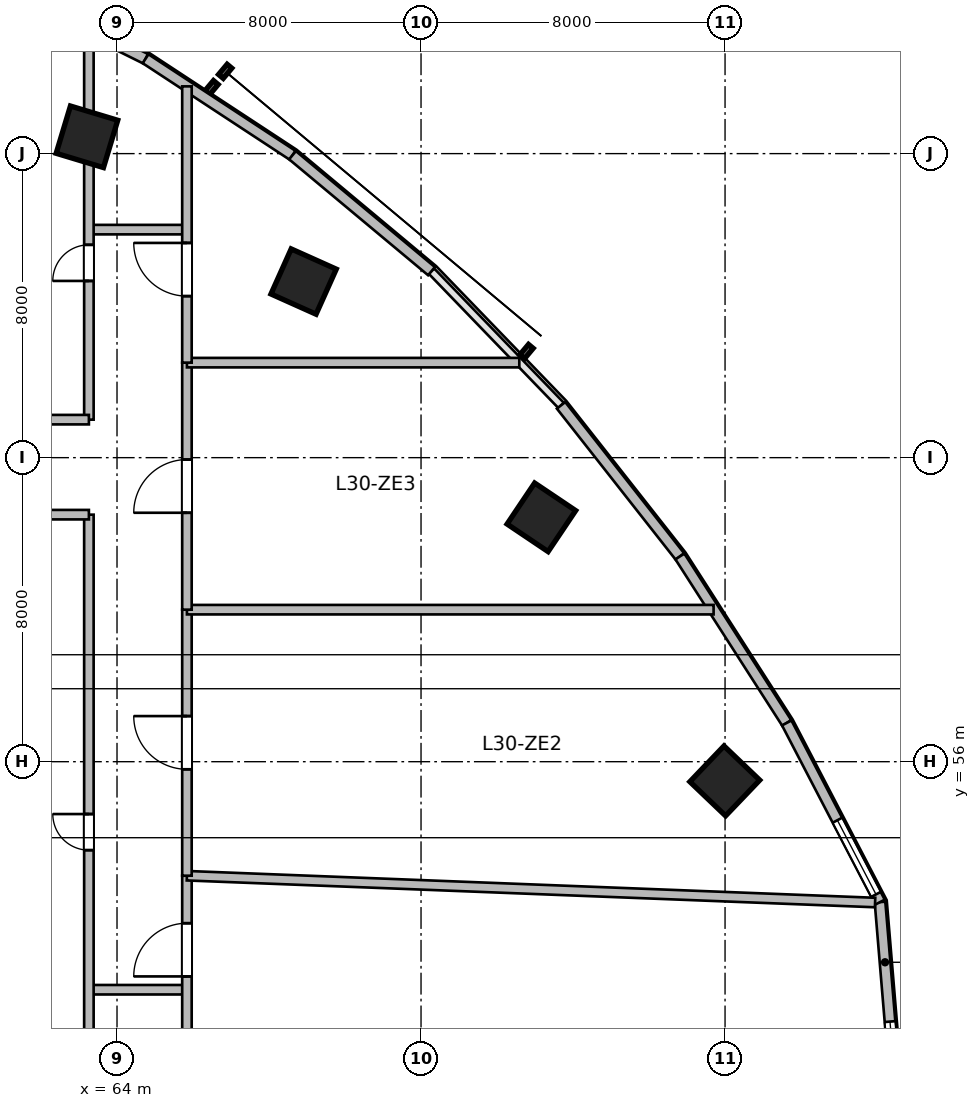
"""IFC4 building model, lengths in metres.
Left out: names, types, materials, properties, quantities, classifications, styles, units other than length and angle.
Written with IfcOpenShell. Run it as: python <this file> out.ifc"""

import sys

from ifc_helpers import new_model, si_unit, direction, frame, frame_2d, origin, origin_2d, place, context, subcontext, project, spatial, rectangle, extrude, source, transform, mapped, element, fill, save


model = new_model("IFC4")
c1 = context("Model", 3, precision=1e-05, world=origin(), true_north=direction((0.0, 1.0)))
c2 = subcontext(c1, "Body", "Model", "MODEL_VIEW")
j1 = project(units=[si_unit("LENGTHUNIT", "METRE"), si_unit("PLANEANGLEUNIT", "RADIAN")], contexts=[c1])
p1 = place(None, origin())
s1 = spatial("IfcSite", under=j1, at=p1, CompositionType="ELEMENT")
p2 = place(p1, origin())
s2 = spatial("IfcBuilding", under=s1, at=p2, CompositionType="ELEMENT")
p3 = place(p2, frame((0.0, 0.0, 127.2)))
s3 = spatial("IfcBuildingStorey", under=s2, at=p3, CompositionType="ELEMENT", Elevation=127.2)
m1 = source(origin(), c2, "Body", "SweptSolid", [
    extrude(rectangle(XDim=1.3, YDim=1.3, at=origin_2d()), origin(), (0.0, 0.0, 1.0), 3.9),
])
for number, where, z_axis, x_axis in (
    (1, (63.209, 72.442, 0.0), (0.0, 0.0, 1.0), (0.289, 0.957, 0.0)),
    (2, (68.91, 68.633, 0.0), (0.0, 0.0, 1.0), (0.409, 0.912, 0.0)),
    (3, (75.167, 62.43, 0.0), (0.0, 0.0, 1.0), (0.558, 0.83, 0.0)),
    (4, (79.993, 55.494, 0.0), (0.0, 0.0, 1.0), (0.691, 0.723, 0.0)),
):
    element("IfcColumn", number, at=place(p3, frame(where, z_axis=z_axis, x_axis=x_axis)), inside=s3, PredefinedType="COLUMN", context=c2, shape_type="MappedRepresentation", body=[
        mapped(m1, transform((0.0, 0.0, 0.0), scale=1.0)),
    ])
m2 = source(origin(), c2, "Body", "SweptSolid", [
    extrude(rectangle(XDim=5.674, YDim=0.28, at=frame_2d((2.837, 0.0))), origin(), (0.0, 0.0, 1.0), 3.65),
])
p4 = place(p3, frame((84.078, 52.305, 0.0), z_axis=(0.0, 0.0, 1.0), x_axis=(0.083309007867, -0.996523762491, 0.0)))
e5 = element("IfcWall", 5, at=p4, inside=s3, PredefinedType="SOLIDWALL", context=c2, shape_type="MappedRepresentation", body=[
    mapped(m2, transform((0.0, 0.0, 0.0), scale=1.0)),
])
p5 = place(p4, frame((3.155, 0.0, 0.95)))
e6 = element("IfcOpeningElement", 6, at=p5, cuts=e5, PredefinedType="OPENING", context=c2, shape_type="SweptSolid", body=[
    extrude(rectangle(XDim=2.2, YDim=2.1, at=frame_2d((1.1, 1.05))), frame((0.0, 0.15, 0.0), z_axis=(0.0, -1.0, 0.0), x_axis=(1.0, 0.0, 0.0)), (0.0, 0.0, 1.0), 0.3),
])
m3 = source(origin(), c2, "Body", "SweptSolid", [
    extrude(rectangle(XDim=4.506, YDim=0.28, at=frame_2d((2.253, 0.0))), origin(), (0.0, 0.0, 1.0), 3.65),
])
p6 = place(p3, frame((60.714, 76.497, 0.0), z_axis=(0.0, 0.0, 1.0), x_axis=(0.89597155075, -0.444111450254, 0.0)))
e7 = element("IfcWall", 7, at=p6, inside=s3, PredefinedType="SOLIDWALL", context=c2, shape_type="MappedRepresentation", body=[
    mapped(m3, transform((0.0, 0.0, 0.0), scale=1.0)),
])
m4 = source(origin(), c2, "Body", "SweptSolid", [
    extrude(rectangle(XDim=4.626, YDim=0.28, at=frame_2d((2.313, 0.0))), origin(), (0.0, 0.0, 1.0), 3.65),
])
p7 = place(p3, frame((64.751, 74.496, 0.0), z_axis=(0.0, 0.0, 1.0), x_axis=(0.83595938331, -0.548791316855, 0.0)))
e8 = element("IfcWall", 8, at=p7, inside=s3, PredefinedType="SOLIDWALL", context=c2, shape_type="MappedRepresentation", body=[
    mapped(m4, transform((0.0, 0.0, 0.0), scale=1.0)),
])
m5 = source(origin(), c2, "Body", "SweptSolid", [
    extrude(rectangle(XDim=4.762, YDim=0.28, at=frame_2d((2.381, 0.0))), origin(), (0.0, 0.0, 1.0), 3.65),
])
p8 = place(p3, frame((68.618, 71.958, 0.0), z_axis=(0.0, 0.0, 1.0), x_axis=(0.767952279762, -0.640507061638, 0.0)))
e9 = element("IfcWall", 9, at=p8, inside=s3, PredefinedType="SOLIDWALL", context=c2, shape_type="MappedRepresentation", body=[
    mapped(m5, transform((0.0, 0.0, 0.0), scale=1.0)),
])
m6 = source(origin(), c2, "Body", "SweptSolid", [
    extrude(rectangle(XDim=5.058, YDim=0.28, at=frame_2d((2.529, 0.0))), origin(), (0.0, 0.0, 1.0), 3.65),
])
p9 = place(p3, frame((75.685, 65.376, 0.0), z_axis=(0.0, 0.0, 1.0), x_axis=(0.618145507434, -0.786063694391, 0.0)))
e10 = element("IfcWall", 10, at=p9, inside=s3, PredefinedType="SOLIDWALL", context=c2, shape_type="MappedRepresentation", body=[
    mapped(m6, transform((0.0, 0.0, 0.0), scale=1.0)),
])
m7 = source(origin(), c2, "Body", "SweptSolid", [
    extrude(rectangle(XDim=5.205, YDim=0.28, at=frame_2d((2.603, 0.0))), origin(), (0.0, 0.0, 1.0), 3.65),
])
p10 = place(p3, frame((78.812, 61.4, 0.0), z_axis=(0.0, 0.0, 1.0), x_axis=(0.540188528895, -0.8415440293, 0.0)))
e11 = element("IfcWall", 11, at=p10, inside=s3, PredefinedType="SOLIDWALL", context=c2, shape_type="MappedRepresentation", body=[
    mapped(m7, transform((0.0, 0.0, 0.0), scale=1.0)),
])
m8 = source(origin(), c2, "Body", "SweptSolid", [
    extrude(rectangle(XDim=5.315, YDim=0.28, at=frame_2d((2.658, 0.0))), origin(), (0.0, 0.0, 1.0), 3.65),
])
p11 = place(p3, frame((81.623, 57.02, 0.0), z_axis=(0.0, 0.0, 1.0), x_axis=(0.461760527822, -0.887004630735, 0.0)))
e12 = element("IfcWall", 12, at=p11, inside=s3, PredefinedType="SOLIDWALL", context=c2, shape_type="MappedRepresentation", body=[
    mapped(m8, transform((0.0, 0.0, 0.0), scale=1.0)),
])
p12 = place(p11, frame((2.886, 0.0, 0.95)))
e13 = element("IfcOpeningElement", 13, at=p12, cuts=e12, PredefinedType="OPENING", context=c2, shape_type="SweptSolid", body=[
    extrude(rectangle(XDim=2.2, YDim=2.1, at=frame_2d((1.1, 1.05))), frame((0.0, 0.15, 0.0), z_axis=(0.0, -1.0, 0.0), x_axis=(1.0, 0.0, 0.0)), (0.0, 0.0, 1.0), 0.3),
])
m9 = source(origin(), c2, "Body", "SweptSolid", [
    extrude(rectangle(XDim=2.5, YDim=0.25, at=frame_2d((1.25, 0.0))), origin(), (0.0, 0.0, 1.0), 3.65),
])
for number, where, z_axis, x_axis in (
    (14, (63.3, 50.0, 0.0), (0.0, 0.0, 1.0), (1.0, 0.0, 0.0)),
    (15, (63.3, 70.0, 0.0), (0.0, 0.0, 1.0), (1.0, 0.0, 0.0)),
):
    element("IfcWall", number, at=place(p3, frame(where, z_axis=z_axis, x_axis=x_axis)), inside=s3, PredefinedType="PARTITIONING", context=c2, shape_type="MappedRepresentation", body=[
        mapped(m9, transform((0.0, 0.0, 0.0), scale=1.0)),
    ])
m10 = source(origin(), c2, "Body", "SweptSolid", [
    extrude(rectangle(XDim=10.726, YDim=0.25, at=frame_2d((5.363, 0.0))), origin(), (0.0, 0.0, 1.0), 2.942),
])
p13 = place(p3, frame((65.84, 42.274, 0.0), z_axis=(0.0, 0.0, 1.0), x_axis=(0.0, 1.0, 0.0)))
e16 = element("IfcWall", 16, at=p13, inside=s3, PredefinedType="PARTITIONING", context=c2, shape_type="MappedRepresentation", body=[
    mapped(m10, transform((0.0, 0.0, 0.0), scale=1.0)),
])
p14 = place(p13, frame((8.076, 0.0, 0.0)))
e17 = element("IfcOpeningElement", 17, at=p14, cuts=e16, PredefinedType="OPENING", context=c2, shape_type="SweptSolid", body=[
    extrude(rectangle(XDim=1.4, YDim=2.15, at=frame_2d((0.7, 1.075))), frame((0.0, 0.135, 0.0), z_axis=(0.0, -1.0, 0.0), x_axis=(1.0, 0.0, 0.0)), (0.0, 0.0, 1.0), 0.27),
])
m11 = source(origin(), c2, "Body", "SweptSolid", [
    extrude(rectangle(XDim=18.122, YDim=0.25, at=frame_2d((9.061, 0.0))), origin(), (0.0, 0.0, 1.0), 3.65),
])
p15 = place(p3, frame((65.84, 53.0, 0.0), z_axis=(0.0, 0.0, 1.0), x_axis=(0.999241241773, -0.038947923447, 0.0)))
e18 = element("IfcWall", 18, at=p15, inside=s3, PredefinedType="PARTITIONING", context=c2, shape_type="MappedRepresentation", body=[
    mapped(m11, transform((0.0, 0.0, 0.0), scale=1.0)),
])
m12 = source(origin(), c2, "Body", "SweptSolid", [
    extrude(rectangle(XDim=7.0, YDim=0.25, at=frame_2d((3.5, 0.0))), origin(), (0.0, 0.0, 1.0), 3.093),
])
p16 = place(p3, frame((65.84, 53.0, 0.0), z_axis=(0.0, 0.0, 1.0), x_axis=(0.0, 1.0, 0.0)))
e19 = element("IfcWall", 19, at=p16, inside=s3, PredefinedType="PARTITIONING", context=c2, shape_type="MappedRepresentation", body=[
    mapped(m12, transform((0.0, 0.0, 0.0), scale=1.0)),
])
p17 = place(p16, frame((2.8, 0.0, 0.0)))
e20 = element("IfcOpeningElement", 20, at=p17, cuts=e19, PredefinedType="OPENING", context=c2, shape_type="SweptSolid", body=[
    extrude(rectangle(XDim=1.4, YDim=2.15, at=frame_2d((0.7, 1.075))), frame((0.0, 0.135, 0.0), z_axis=(0.0, -1.0, 0.0), x_axis=(1.0, 0.0, 0.0)), (0.0, 0.0, 1.0), 0.27),
])
m13 = source(origin(), c2, "Body", "SweptSolid", [
    extrude(rectangle(XDim=13.858, YDim=0.25, at=frame_2d((6.929, 0.0))), origin(), (0.0, 0.0, 1.0), 3.65),
])
p18 = place(p3, frame((65.84, 60.0, 0.0), z_axis=(0.0, 0.0, 1.0), x_axis=(1.0, 0.0, 0.0)))
e21 = element("IfcWall", 21, at=p18, inside=s3, PredefinedType="PARTITIONING", context=c2, shape_type="MappedRepresentation", body=[
    mapped(m13, transform((0.0, 0.0, 0.0), scale=1.0)),
])
m14 = source(origin(), c2, "Body", "SweptSolid", [
    extrude(rectangle(XDim=6.5, YDim=0.25, at=frame_2d((3.25, 0.0))), origin(), (0.0, 0.0, 1.0), 2.942),
])
p19 = place(p3, frame((65.84, 60.0, 0.0), z_axis=(0.0, 0.0, 1.0), x_axis=(0.0, 1.0, 0.0)))
e22 = element("IfcWall", 22, at=p19, inside=s3, PredefinedType="PARTITIONING", context=c2, shape_type="MappedRepresentation", body=[
    mapped(m14, transform((0.0, 0.0, 0.0), scale=1.0)),
])
p20 = place(p19, frame((2.55, 0.0, 0.0)))
e23 = element("IfcOpeningElement", 23, at=p20, cuts=e22, PredefinedType="OPENING", context=c2, shape_type="SweptSolid", body=[
    extrude(rectangle(XDim=1.4, YDim=2.15, at=frame_2d((0.7, 1.075))), frame((0.0, 0.135, 0.0), z_axis=(0.0, -1.0, 0.0), x_axis=(1.0, 0.0, 0.0)), (0.0, 0.0, 1.0), 0.27),
])
m15 = source(origin(), c2, "Body", "SweptSolid", [
    extrude(rectangle(XDim=8.746, YDim=0.25, at=frame_2d((4.373, 0.0))), origin(), (0.0, 0.0, 1.0), 3.65),
])
p21 = place(p3, frame((65.84, 66.5, 0.0), z_axis=(0.0, 0.0, 1.0), x_axis=(1.0, 0.0, 0.0)))
e24 = element("IfcWall", 24, at=p21, inside=s3, PredefinedType="PARTITIONING", context=c2, shape_type="MappedRepresentation", body=[
    mapped(m15, transform((0.0, 0.0, 0.0), scale=1.0)),
])
m16 = source(origin(), c2, "Body", "SweptSolid", [
    extrude(rectangle(XDim=7.27, YDim=0.25, at=frame_2d((3.635, 0.0))), origin(), (0.0, 0.0, 1.0), 3.65),
])
p22 = place(p3, frame((65.84, 66.5, 0.0), z_axis=(0.0, 0.0, 1.0), x_axis=(0.0, 1.0, 0.0)))
e25 = element("IfcWall", 25, at=p22, inside=s3, PredefinedType="PARTITIONING", context=c2, shape_type="MappedRepresentation", body=[
    mapped(m16, transform((0.0, 0.0, 0.0), scale=1.0)),
])
p23 = place(p22, frame((1.75, 0.0, 0.0)))
e26 = element("IfcOpeningElement", 26, at=p23, cuts=e25, PredefinedType="OPENING", context=c2, shape_type="SweptSolid", body=[
    extrude(rectangle(XDim=1.4, YDim=2.15, at=frame_2d((0.7, 1.075))), frame((0.0, 0.135, 0.0), z_axis=(0.0, -1.0, 0.0), x_axis=(1.0, 0.0, 0.0)), (0.0, 0.0, 1.0), 0.27),
])
m17 = source(origin(), c2, "Body", "SweptSolid", [
    extrude(rectangle(XDim=16.706, YDim=0.25, at=frame_2d((8.353, 0.0))), origin(), (0.0, 0.0, 1.0), 2.942),
])
p24 = place(p3, frame((63.26, 45.794, 0.0), z_axis=(0.0, 0.0, 1.0), x_axis=(0.0, 1.0, 0.0)))
e27 = element("IfcWall", 27, at=p24, inside=s3, PredefinedType="PARTITIONING", context=c2, shape_type="MappedRepresentation", body=[
    mapped(m17, transform((0.0, 0.0, 0.0), scale=1.0)),
])
p25 = place(p24, frame((7.878, 0.0, 0.0)))
e28 = element("IfcOpeningElement", 28, at=p25, cuts=e27, PredefinedType="OPENING", context=c2, shape_type="SweptSolid", body=[
    extrude(rectangle(XDim=0.95, YDim=2.1, at=frame_2d((0.475, 1.05))), frame((0.0, 0.135, 0.0), z_axis=(0.0, -1.0, 0.0), x_axis=(1.0, 0.0, 0.0)), (0.0, 0.0, 1.0), 0.27),
])
m18 = source(origin(), c2, "Body", "SweptSolid", [
    extrude(rectangle(XDim=3.76, YDim=0.25, at=frame_2d((1.88, 0.0))), origin(), (0.0, 0.0, 1.0), 3.65),
])
p26 = place(p3, frame((59.5, 62.5, 0.0), z_axis=(0.0, 0.0, 1.0), x_axis=(1.0, 0.0, 0.0)))
e29 = element("IfcWall", 29, at=p26, inside=s3, PredefinedType="PARTITIONING", context=c2, shape_type="MappedRepresentation", body=[
    mapped(m18, transform((0.0, 0.0, 0.0), scale=1.0)),
])
m19 = source(origin(), c2, "Body", "SweptSolid", [
    extrude(rectangle(XDim=10.224, YDim=0.25, at=frame_2d((5.112, 0.0))), origin(), (0.0, 0.0, 1.0), 3.65),
])
p27 = place(p3, frame((63.26, 65.0, 0.0), z_axis=(0.0, 0.0, 1.0), x_axis=(0.0, 1.0, 0.0)))
e30 = element("IfcWall", 30, at=p27, inside=s3, PredefinedType="PARTITIONING", context=c2, shape_type="MappedRepresentation", body=[
    mapped(m19, transform((0.0, 0.0, 0.0), scale=1.0)),
])
p28 = place(p27, frame((3.65, 0.0, 0.0)))
e31 = element("IfcOpeningElement", 31, at=p28, cuts=e30, PredefinedType="OPENING", context=c2, shape_type="SweptSolid", body=[
    extrude(rectangle(XDim=0.95, YDim=2.1, at=frame_2d((0.475, 1.05))), frame((0.0, 0.135, 0.0), z_axis=(0.0, -1.0, 0.0), x_axis=(1.0, 0.0, 0.0)), (0.0, 0.0, 1.0), 0.27),
])
m20 = source(origin(), c2, "Body", "SweptSolid", [
    extrude(rectangle(XDim=1.66, YDim=0.25, at=frame_2d((0.83, 0.0))), origin(), (0.0, 0.0, 1.0), 3.65),
])
p29 = place(p3, frame((61.6, 65.0, 0.0), z_axis=(0.0, 0.0, 1.0), x_axis=(1.0, 0.0, 0.0)))
e32 = element("IfcWall", 32, at=p29, inside=s3, PredefinedType="PARTITIONING", context=c2, shape_type="MappedRepresentation", body=[
    mapped(m20, transform((0.0, 0.0, 0.0), scale=1.0)),
])
m21 = source(origin(), c2, "Body", "SweptSolid", [
    extrude(rectangle(XDim=2.2, YDim=2.1, at=frame_2d((1.1, 1.05))), frame((0.0, 0.03, 0.0), z_axis=(0.0, -1.0, 0.0), x_axis=(1.0, 0.0, 0.0)), (0.0, 0.0, 1.0), 0.06),
])
p30 = place(p5, origin())
e33 = element("IfcWindow", 33, at=p30, inside=s3, PartitioningType="TRIPLE_PANEL_VERTICAL", PredefinedType="WINDOW", context=c2, shape_type="MappedRepresentation", body=[
    mapped(m21, transform((0.0, 0.0, 0.0), scale=1.0)),
])
fill(e6, e33)
p31 = place(p12, origin())
e34 = element("IfcWindow", 34, at=p31, inside=s3, PartitioningType="TRIPLE_PANEL_VERTICAL", PredefinedType="WINDOW", context=c2, shape_type="MappedRepresentation", body=[
    mapped(m21, transform((0.0, 0.0, 0.0), scale=1.0)),
])
fill(e13, e34)
m22 = source(origin(), c2, "Body", "SweptSolid", [
    extrude(rectangle(XDim=1.4, YDim=2.15, at=frame_2d((0.7, 1.075))), frame((0.0, 0.025, 0.0), z_axis=(0.0, -1.0, 0.0), x_axis=(1.0, 0.0, 0.0)), (0.0, 0.0, 1.0), 0.05),
])
p32 = place(p14, origin())
e35 = element("IfcDoor", 35, at=p32, inside=s3, OperationType="SINGLE_SWING_LEFT", PredefinedType="DOOR", context=c2, shape_type="MappedRepresentation", body=[
    mapped(m22, transform((0.0, 0.0, 0.0), scale=1.0)),
])
fill(e17, e35)
p33 = place(p17, origin())
e36 = element("IfcDoor", 36, at=p33, inside=s3, OperationType="SINGLE_SWING_RIGHT", PredefinedType="DOOR", context=c2, shape_type="MappedRepresentation", body=[
    mapped(m22, transform((0.0, 0.0, 0.0), scale=1.0)),
])
fill(e20, e36)
p34 = place(p20, origin())
e37 = element("IfcDoor", 37, at=p34, inside=s3, OperationType="SINGLE_SWING_LEFT", PredefinedType="DOOR", context=c2, shape_type="MappedRepresentation", body=[
    mapped(m22, transform((0.0, 0.0, 0.0), scale=1.0)),
])
fill(e23, e37)
p35 = place(p23, origin())
e38 = element("IfcDoor", 38, at=p35, inside=s3, OperationType="SINGLE_SWING_RIGHT", PredefinedType="DOOR", context=c2, shape_type="MappedRepresentation", body=[
    mapped(m22, transform((0.0, 0.0, 0.0), scale=1.0)),
])
fill(e26, e38)
m23 = source(origin(), c2, "Body", "SweptSolid", [
    extrude(rectangle(XDim=0.95, YDim=2.1, at=frame_2d((0.475, 1.05))), frame((0.0, 0.025, 0.0), z_axis=(0.0, -1.0, 0.0), x_axis=(1.0, 0.0, 0.0)), (0.0, 0.0, 1.0), 0.05),
])
p36 = place(p25, origin())
e39 = element("IfcDoor", 39, at=p36, inside=s3, OperationType="SINGLE_SWING_RIGHT", PredefinedType="DOOR", context=c2, shape_type="MappedRepresentation", body=[
    mapped(m23, transform((0.0, 0.0, 0.0), scale=1.0)),
])
fill(e28, e39)
p37 = place(p28, origin())
e40 = element("IfcDoor", 40, at=p37, inside=s3, OperationType="SINGLE_SWING_LEFT", PredefinedType="DOOR", context=c2, shape_type="MappedRepresentation", body=[
    mapped(m23, transform((0.0, 0.0, 0.0), scale=1.0)),
])
fill(e31, e40)
save(model, sys.argv[1])
